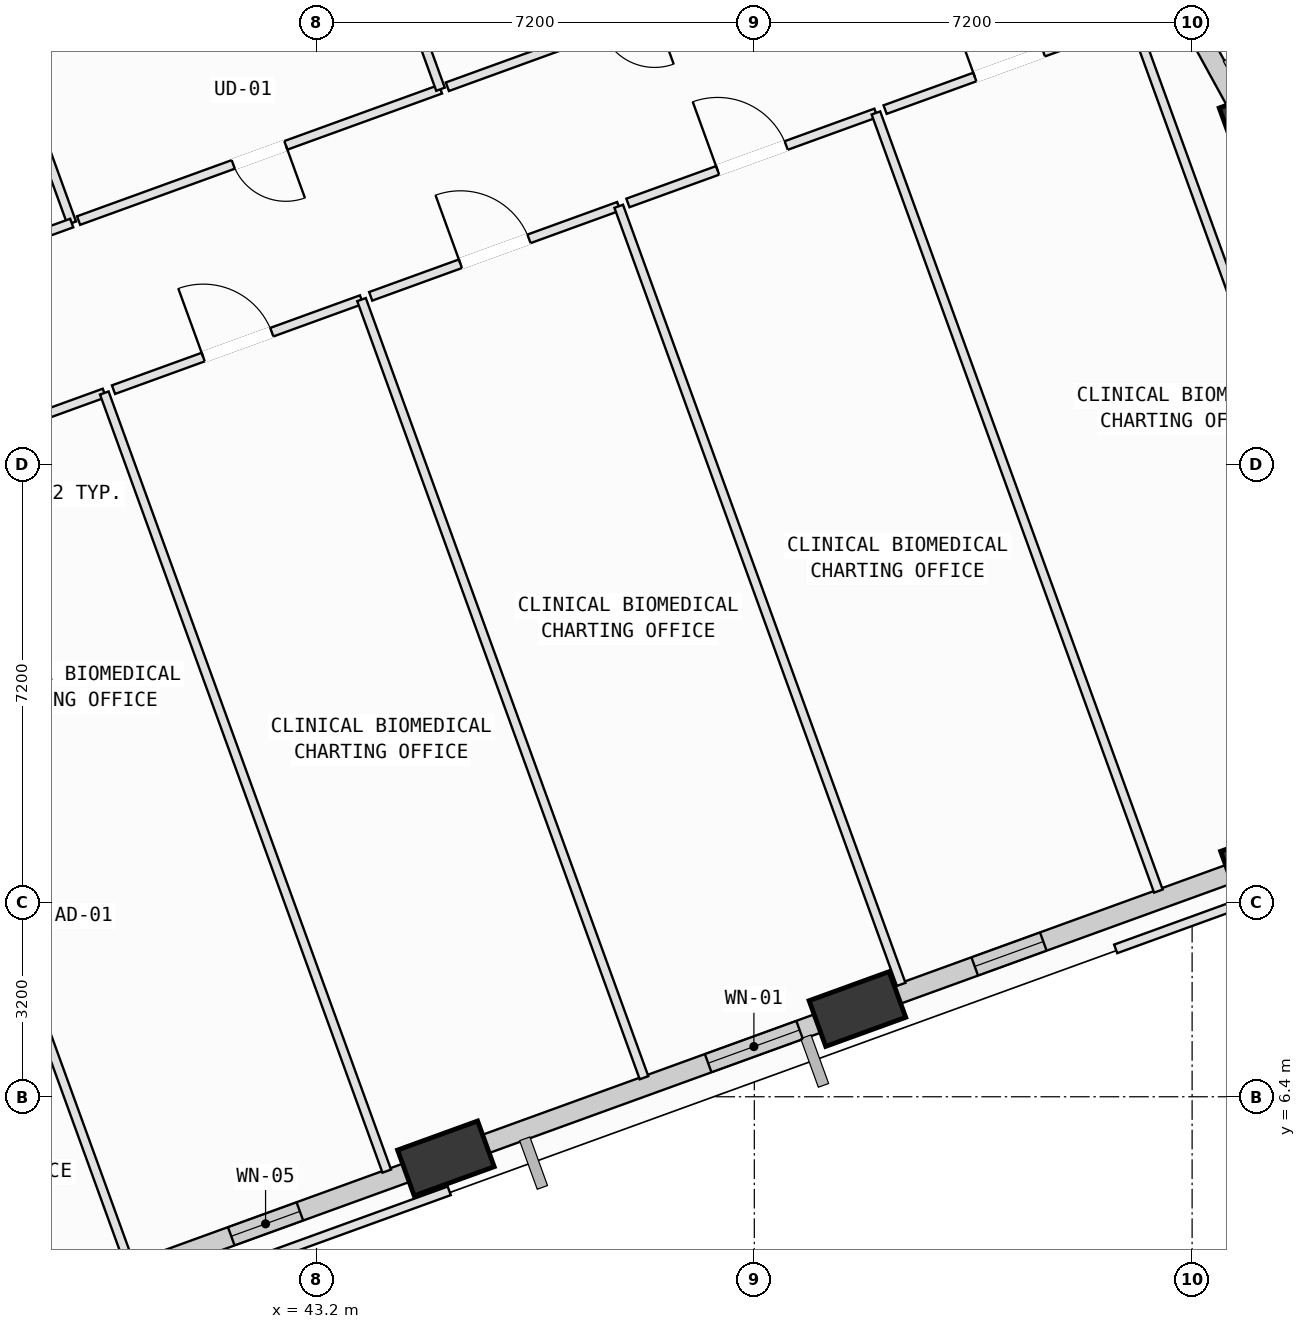
"""IFC4 building model, lengths in metres.
Left out: names, types, materials, properties, quantities, classifications, styles, units other than length and angle.
Written with IfcOpenShell. Run it as: python <this file> out.ifc"""

import sys

from ifc_helpers import new_model, si_unit, direction, frame, frame_2d, origin, origin_2d, place, context, subcontext, project, spatial, rectangle, extrude, element, fill, save


model = new_model("IFC4")
c1 = context("Model", 3, precision=1e-05, world=origin(), true_north=direction((0.0, 1.0)))
c2 = subcontext(c1, "Body", "Model", "MODEL_VIEW")
j1 = project(units=[si_unit("LENGTHUNIT", "METRE"), si_unit("PLANEANGLEUNIT", "RADIAN")], contexts=[c1])
p1 = place(None, origin())
s1 = spatial("IfcSite", under=j1, at=p1, CompositionType="ELEMENT")
p2 = place(p1, origin())
s2 = spatial("IfcBuilding", under=s1, at=p2, CompositionType="ELEMENT")
p3 = place(p2, frame((0.0, 0.0, 108.4)))
s3 = spatial("IfcBuildingStorey", under=s2, at=p3, CompositionType="ELEMENT", Elevation=108.4)
p4 = place(p3, frame((45.328, 5.386, 0.002), z_axis=(0.079678110457, 0.049084148961, 0.9956114428), x_axis=(-0.78224874538, 0.62214735669, 0.031930657927)))
e1 = element("IfcColumn", 1, at=p4, inside=s3, PredefinedType="COLUMN", context=c2, shape_type="SweptSolid", body=[
    extrude(rectangle(XDim=1.4, YDim=0.8, at=origin_2d()), origin(), (0.0, 0.0, 1.0), 4.014),
])
p5 = place(p3, frame((52.096, 7.843, 0.002), z_axis=(0.069270333832, 0.076805001722, 0.994636924994), x_axis=(-0.925321067949, 0.377538817765, 0.03528969099)))
e2 = element("IfcColumn", 2, at=p5, inside=s3, PredefinedType="COLUMN", context=c2, shape_type="SweptSolid", body=[
    extrude(rectangle(XDim=1.4, YDim=0.8, at=origin_2d()), origin(), (0.0, 0.0, 1.0), 4.018),
])
p6 = place(p3, frame((58.864, 10.3, 0.002), z_axis=(0.058831075792, 0.104440322179, 0.992789566638), x_axis=(-0.985243313153, 0.166201162188, 0.040899725852)))
e3 = element("IfcColumn", 3, at=p6, inside=s3, PredefinedType="COLUMN", context=c2, shape_type="SweptSolid", body=[
    extrude(rectangle(XDim=1.4, YDim=0.8, at=origin_2d()), origin(), (0.0, 0.0, 1.0), 4.025),
])
p7 = place(p3, frame((58.661, 22.141, 0.002), z_axis=(0.010086228897, 0.103414226406, 0.994587233863), x_axis=(0.248836012635, -0.96360846528, 0.097669670096)))
e4 = element("IfcColumn", 4, at=p7, inside=s3, PredefinedType="COLUMN", context=c2, shape_type="SweptSolid", body=[
    extrude(rectangle(XDim=1.4, YDim=0.8, at=origin_2d()), origin(), (0.0, 0.0, 1.0), 4.018),
])
p8 = place(p3, frame((45.036, 5.281, 0.0), z_axis=(0.0, 0.0, 1.0), x_axis=(-0.93999646123, -0.341184192006, 0.0)))
e5 = element("IfcWall", 5, at=p8, inside=s3, PredefinedType="SOLIDWALL", context=c2, shape_type="SweptSolid", body=[
    extrude(rectangle(XDim=6.209, YDim=0.32, at=frame_2d((3.104, 0.0))), origin(), (0.0, 0.0, 1.0), 3.165),
])
p9 = place(p8, frame((2.244, 0.0, 0.75)))
e6 = element("IfcOpeningElement", 6, at=p9, cuts=e5, PredefinedType="OPENING", context=c2, shape_type="SweptSolid", body=[
    extrude(rectangle(XDim=1.2, YDim=1.75, at=frame_2d((0.6, 0.875))), frame((0.0, 0.17, 0.0), z_axis=(0.0, -1.0, 0.0), x_axis=(1.0, 0.0, 0.0)), (0.0, 0.0, 1.0), 0.34),
])
p10 = place(p3, frame((51.811, 7.74, 0.0), z_axis=(0.0, 0.0, 1.0), x_axis=(-0.939992730325, -0.341194470846, 0.0)))
e7 = element("IfcWall", 7, at=p10, inside=s3, PredefinedType="SOLIDWALL", context=c2, shape_type="SweptSolid", body=[
    extrude(rectangle(XDim=6.218, YDim=0.32, at=frame_2d((3.109, 0.0))), origin(), (0.0, 0.0, 1.0), 3.165),
])
p11 = place(p10, frame((0.708, 0.0, 0.75)))
e8 = element("IfcOpeningElement", 8, at=p11, cuts=e7, PredefinedType="OPENING", context=c2, shape_type="SweptSolid", body=[
    extrude(rectangle(XDim=1.6, YDim=1.95, at=frame_2d((0.8, 0.975))), frame((0.0, 0.17, 0.0), z_axis=(0.0, -1.0, 0.0), x_axis=(1.0, 0.0, 0.0)), (0.0, 0.0, 1.0), 0.34),
])
p12 = place(p3, frame((58.593, 10.202, 0.0), z_axis=(0.0, 0.0, 1.0), x_axis=(-0.939989678863, -0.341202877524, 0.0)))
e9 = element("IfcWall", 9, at=p12, inside=s3, PredefinedType="SOLIDWALL", context=c2, shape_type="SweptSolid", body=[
    extrude(rectangle(XDim=6.242, YDim=0.32, at=frame_2d((3.121, 0.0))), origin(), (0.0, 0.0, 1.0), 3.165),
])
p13 = place(p12, frame((3.66, 0.0, 0.75)))
e10 = element("IfcOpeningElement", 10, at=p13, cuts=e9, PredefinedType="OPENING", context=c2, shape_type="SweptSolid", body=[
    extrude(rectangle(XDim=1.2, YDim=1.75, at=frame_2d((0.6, 0.875))), frame((0.0, 0.17, 0.0), z_axis=(0.0, -1.0, 0.0), x_axis=(1.0, 0.0, 0.0)), (0.0, 0.0, 1.0), 0.34),
])
p14 = place(p3, frame((54.097, 30.464, 0.0), z_axis=(0.0, 0.0, 1.0), x_axis=(0.480836721767, -0.876810154481, 0.0)))
e11 = element("IfcWall", 11, at=p14, inside=s3, PredefinedType="SOLIDWALL", context=c2, shape_type="SweptSolid", body=[
    extrude(rectangle(XDim=8.838, YDim=0.32, at=frame_2d((4.419, 0.0))), origin(), (0.0, 0.0, 1.0), 3.165),
])
p15 = place(p3, frame((36.15, 14.595, 0.0), z_axis=(0.0, 0.0, 1.0), x_axis=(0.341228228972, -0.939980476261, 0.0)))
e12 = element("IfcWall", 12, at=p15, inside=s3, PredefinedType="PARTITIONING", context=c2, shape_type="SweptSolid", body=[
    extrude(rectangle(XDim=11.652, YDim=0.15, at=frame_2d((5.826, 0.0))), origin(), (0.0, 0.0, 1.0), 3.78),
])
p16 = place(p15, frame((5.396, 0.0, 0.0)))
e13 = element("IfcOpeningElement", 13, at=p16, cuts=e12, PredefinedType="OPENING", context=c2, shape_type="SweptSolid", body=[
    extrude(rectangle(XDim=0.86, YDim=2.06, at=frame_2d((0.43, 1.03))), frame((0.0, 0.085, 0.0), z_axis=(0.0, -1.0, 0.0), x_axis=(1.0, 0.0, 0.0)), (0.0, 0.0, 1.0), 0.17),
])
p17 = place(p3, frame((36.5, 16.81, 0.0), z_axis=(0.0, 0.0, 1.0), x_axis=(0.94000198953, 0.341168960605, 0.0)))
e14 = element("IfcWall", 14, at=p17, inside=s3, PredefinedType="PARTITIONING", context=c2, shape_type="SweptSolid", body=[
    extrude(rectangle(XDim=3.415, YDim=0.15, at=frame_2d((1.708, 0.0))), origin(), (0.0, 0.0, 1.0), 2.965),
])
p18 = place(p17, frame((1.107, 0.0, 0.0)))
e15 = element("IfcOpeningElement", 15, at=p18, cuts=e14, PredefinedType="OPENING", context=c2, shape_type="SweptSolid", body=[
    extrude(rectangle(XDim=1.2, YDim=2.15, at=frame_2d((0.6, 1.075))), frame((0.0, 0.085, 0.0), z_axis=(0.0, -1.0, 0.0), x_axis=(1.0, 0.0, 0.0)), (0.0, 0.0, 1.0), 0.17),
])
p19 = place(p3, frame((39.71, 17.975, 0.0), z_axis=(0.0, 0.0, 1.0), x_axis=(0.341169968064, -0.940001623877, 0.0)))
e16 = element("IfcWall", 16, at=p19, inside=s3, PredefinedType="PARTITIONING", context=c2, shape_type="SweptSolid", body=[
    extrude(rectangle(XDim=13.615, YDim=0.15, at=frame_2d((6.808, 0.0))), origin(), (0.0, 0.0, 1.0), 3.78),
])
p20 = place(p3, frame((39.861, 18.03, 0.0), z_axis=(0.0, 0.0, 1.0), x_axis=(0.939960863027, 0.341282252656, 0.0)))
e17 = element("IfcWall", 17, at=p20, inside=s3, PredefinedType="PARTITIONING", context=c2, shape_type="SweptSolid", body=[
    extrude(rectangle(XDim=4.339, YDim=0.15, at=frame_2d((2.17, 0.0))), origin(), (0.0, 0.0, 1.0), 2.965),
])
p21 = place(p20, frame((1.57, 0.0, 0.0)))
e18 = element("IfcOpeningElement", 18, at=p21, cuts=e17, PredefinedType="OPENING", context=c2, shape_type="SweptSolid", body=[
    extrude(rectangle(XDim=1.2, YDim=2.15, at=frame_2d((0.6, 1.075))), frame((0.0, 0.085, 0.0), z_axis=(0.0, -1.0, 0.0), x_axis=(1.0, 0.0, 0.0)), (0.0, 0.0, 1.0), 0.17),
])
p22 = place(p3, frame((43.94, 19.511, 0.0), z_axis=(0.0, 0.0, 1.0), x_axis=(0.341233344025, -0.939978619398, 0.0)))
e19 = element("IfcWall", 19, at=p22, inside=s3, PredefinedType="PARTITIONING", context=c2, shape_type="SweptSolid", body=[
    extrude(rectangle(XDim=13.615, YDim=0.15, at=frame_2d((6.808, 0.0))), origin(), (0.0, 0.0, 1.0), 3.78),
])
p23 = place(p3, frame((46.044, 5.402, 0.0), z_axis=(0.0, 0.0, 1.0), x_axis=(-0.939800627122, -0.341723252445, 0.0)))
e20 = element("IfcWall", 20, at=p23, inside=s3, PredefinedType="PARTITIONING", context=c2, shape_type="SweptSolid", body=[
    extrude(rectangle(XDim=0.99, YDim=0.15, at=frame_2d((0.495, 0.0))), origin(), (0.0, 0.0, 1.0), 3.165),
])
p24 = place(p3, frame((44.091, 19.565, 0.0), z_axis=(0.0, 0.0, 1.0), x_axis=(0.939960863027, 0.341282252656, 0.0)))
e21 = element("IfcWall", 21, at=p24, inside=s3, PredefinedType="PARTITIONING", context=c2, shape_type="SweptSolid", body=[
    extrude(rectangle(XDim=4.339, YDim=0.15, at=frame_2d((2.17, 0.0))), origin(), (0.0, 0.0, 1.0), 3.78),
])
p25 = place(p24, frame((1.57, 0.0, 0.0)))
e22 = element("IfcOpeningElement", 22, at=p25, cuts=e21, PredefinedType="OPENING", context=c2, shape_type="SweptSolid", body=[
    extrude(rectangle(XDim=1.2, YDim=2.15, at=frame_2d((0.6, 1.075))), frame((0.0, 0.085, 0.0), z_axis=(0.0, -1.0, 0.0), x_axis=(1.0, 0.0, 0.0)), (0.0, 0.0, 1.0), 0.17),
])
p26 = place(p3, frame((48.17, 21.046, 0.0), z_axis=(0.0, 0.0, 1.0), x_axis=(0.341175718881, -0.93999953662, 0.0)))
e23 = element("IfcWall", 23, at=p26, inside=s3, PredefinedType="PARTITIONING", context=c2, shape_type="SweptSolid", body=[
    extrude(rectangle(XDim=13.615, YDim=0.15, at=frame_2d((6.807, 0.0))), origin(), (0.0, 0.0, 1.0), 3.78),
])
p27 = place(p3, frame((52.804, 7.856, 0.0), z_axis=(0.0, 0.0, 1.0), x_axis=(-0.940027533904, -0.341098571534, 0.0)))
e24 = element("IfcWall", 24, at=p27, inside=s3, PredefinedType="PARTITIONING", context=c2, shape_type="SweptSolid", body=[
    extrude(rectangle(XDim=0.973, YDim=0.15, at=frame_2d((0.487, 0.0))), origin(), (0.0, 0.0, 1.0), 3.165),
])
p28 = place(p3, frame((48.321, 21.101, 0.0), z_axis=(0.0, 0.0, 1.0), x_axis=(0.940033040483, 0.341083395667, 0.0)))
e25 = element("IfcWall", 25, at=p28, inside=s3, PredefinedType="PARTITIONING", context=c2, shape_type="SweptSolid", body=[
    extrude(rectangle(XDim=4.339, YDim=0.15, at=frame_2d((2.169, 0.0))), origin(), (0.0, 0.0, 1.0), 3.78),
])
p29 = place(p28, frame((1.57, 0.0, 0.0)))
e26 = element("IfcOpeningElement", 26, at=p29, cuts=e25, PredefinedType="OPENING", context=c2, shape_type="SweptSolid", body=[
    extrude(rectangle(XDim=1.2, YDim=2.15, at=frame_2d((0.6, 1.075))), frame((0.0, 0.085, 0.0), z_axis=(0.0, -1.0, 0.0), x_axis=(1.0, 0.0, 0.0)), (0.0, 0.0, 1.0), 0.17),
])
p30 = place(p3, frame((52.4, 22.581, 0.0), z_axis=(0.0, 0.0, 1.0), x_axis=(0.341169968064, -0.940001623877, 0.0)))
e27 = element("IfcWall", 27, at=p30, inside=s3, PredefinedType="PARTITIONING", context=c2, shape_type="SweptSolid", body=[
    extrude(rectangle(XDim=13.615, YDim=0.15, at=frame_2d((6.808, 0.0))), origin(), (0.0, 0.0, 1.0), 3.78),
])
p31 = place(p3, frame((52.551, 22.636, 0.0), z_axis=(0.0, 0.0, 1.0), x_axis=(0.939960863027, 0.341282252656, 0.0)))
e28 = element("IfcWall", 28, at=p31, inside=s3, PredefinedType="PARTITIONING", context=c2, shape_type="SweptSolid", body=[
    extrude(rectangle(XDim=4.339, YDim=0.15, at=frame_2d((2.17, 0.0))), origin(), (0.0, 0.0, 1.0), 3.78),
])
p32 = place(p31, frame((1.57, 0.0, 0.0)))
e29 = element("IfcOpeningElement", 29, at=p32, cuts=e28, PredefinedType="OPENING", context=c2, shape_type="SweptSolid", body=[
    extrude(rectangle(XDim=1.2, YDim=2.15, at=frame_2d((0.6, 1.075))), frame((0.0, 0.085, 0.0), z_axis=(0.0, -1.0, 0.0), x_axis=(1.0, 0.0, 0.0)), (0.0, 0.0, 1.0), 0.17),
])
p33 = place(p3, frame((56.63, 24.117, 0.0), z_axis=(0.0, 0.0, 1.0), x_axis=(0.341191171741, -0.939993927813, 0.0)))
e30 = element("IfcWall", 30, at=p33, inside=s3, PredefinedType="PARTITIONING", context=c2, shape_type="SweptSolid", body=[
    extrude(rectangle(XDim=11.261, YDim=0.15, at=frame_2d((5.63, 0.0))), origin(), (0.0, 0.0, 1.0), 3.78),
])
p34 = place(p3, frame((37.739, 24.723, 0.0), z_axis=(0.0, 0.0, 1.0), x_axis=(0.341248910369, -0.93997296832, 0.0)))
e31 = element("IfcWall", 31, at=p34, inside=s3, PredefinedType="PARTITIONING", context=c2, shape_type="SweptSolid", body=[
    extrude(rectangle(XDim=4.205, YDim=0.15, at=frame_2d((2.103, 0.0))), origin(), (0.0, 0.0, 1.0), 3.78),
])
p35 = place(p3, frame((39.174, 20.77, 0.0), z_axis=(0.0, 0.0, 1.0), x_axis=(-0.940050872134, -0.341034247253, 0.0)))
e32 = element("IfcWall", 32, at=p35, inside=s3, PredefinedType="PARTITIONING", context=c2, shape_type="SweptSolid", body=[
    extrude(rectangle(XDim=1.217, YDim=0.15, at=frame_2d((0.608, 0.0))), origin(), (0.0, 0.0, 1.0), 3.78),
])
p36 = place(p3, frame((45.239, 22.971, 0.0), z_axis=(0.0, 0.0, 1.0), x_axis=(-0.940017254775, -0.341126898273, 0.0)))
e33 = element("IfcWall", 33, at=p36, inside=s3, PredefinedType="PARTITIONING", context=c2, shape_type="SweptSolid", body=[
    extrude(rectangle(XDim=6.332, YDim=0.15, at=frame_2d((3.166, 0.0))), origin(), (0.0, 0.0, 1.0), 2.945),
])
p37 = place(p36, frame((2.706, 0.0, 0.0)))
e34 = element("IfcOpeningElement", 34, at=p37, cuts=e33, PredefinedType="OPENING", context=c2, shape_type="SweptSolid", body=[
    extrude(rectangle(XDim=0.92, YDim=2.1, at=frame_2d((0.46, 1.05))), frame((0.0, 0.085, 0.0), z_axis=(0.0, -1.0, 0.0), x_axis=(1.0, 0.0, 0.0)), (0.0, 0.0, 1.0), 0.17),
])
p38 = place(p3, frame((43.804, 26.924, 0.0), z_axis=(0.0, 0.0, 1.0), x_axis=(0.341230289232, -0.939979728351, 0.0)))
e35 = element("IfcWall", 35, at=p38, inside=s3, PredefinedType="PARTITIONING", context=c2, shape_type="SweptSolid", body=[
    extrude(rectangle(XDim=4.206, YDim=0.15, at=frame_2d((2.103, 0.0))), origin(), (0.0, 0.0, 1.0), 3.365),
])
p39 = place(p3, frame((51.303, 25.173, 0.0), z_axis=(0.0, 0.0, 1.0), x_axis=(-0.939937453114, -0.341346721434, 0.0)))
e36 = element("IfcWall", 36, at=p39, inside=s3, PredefinedType="PARTITIONING", context=c2, shape_type="SweptSolid", body=[
    extrude(rectangle(XDim=6.331, YDim=0.15, at=frame_2d((3.166, 0.0))), origin(), (0.0, 0.0, 1.0), 3.78),
])
p40 = place(p39, frame((2.706, 0.0, 0.0)))
e37 = element("IfcOpeningElement", 37, at=p40, cuts=e36, PredefinedType="OPENING", context=c2, shape_type="SweptSolid", body=[
    extrude(rectangle(XDim=0.92, YDim=2.1, at=frame_2d((0.46, 1.05))), frame((0.0, 0.085, 0.0), z_axis=(0.0, -1.0, 0.0), x_axis=(1.0, 0.0, 0.0)), (0.0, 0.0, 1.0), 0.17),
])
p41 = place(p3, frame((45.383, 4.853, 0.0), z_axis=(0.0, 0.0, 1.0), x_axis=(-0.940026660647, -0.341100978119, 0.0)))
e38 = element("IfcWall", 38, at=p41, inside=s3, PredefinedType="PARTITIONING", context=c2, shape_type="SweptSolid", body=[
    extrude(rectangle(XDim=5.74, YDim=0.15, at=frame_2d((2.87, 0.0))), origin(), (0.0, 0.0, 1.0), 3.78),
])
p42 = place(p3, frame((60.357, 10.289, 0.0), z_axis=(0.0, 0.0, 1.0), x_axis=(-0.939986910804, -0.341210503234, 0.0)))
e39 = element("IfcWall", 39, at=p42, inside=s3, PredefinedType="PARTITIONING", context=c2, shape_type="SweptSolid", body=[
    extrude(rectangle(XDim=4.27, YDim=0.15, at=frame_2d((2.135, 0.0))), origin(), (0.0, 0.0, 1.0), 3.78),
])
p43 = place(p9, origin())
e40 = element("IfcWindow", 40, at=p43, inside=s3, PartitioningType="SINGLE_PANEL", PredefinedType="WINDOW", context=c2, shape_type="SweptSolid", body=[
    extrude(rectangle(XDim=1.2, YDim=1.75, at=frame_2d((0.6, 0.875))), frame((0.0, 0.03, 0.0), z_axis=(0.0, -1.0, 0.0), x_axis=(1.0, 0.0, 0.0)), (0.0, 0.0, 1.0), 0.06),
])
fill(e6, e40)
p44 = place(p11, origin())
e41 = element("IfcWindow", 41, at=p44, inside=s3, PartitioningType="SINGLE_PANEL", PredefinedType="WINDOW", context=c2, shape_type="SweptSolid", body=[
    extrude(rectangle(XDim=1.6, YDim=1.95, at=frame_2d((0.8, 0.975))), frame((0.0, 0.03, 0.0), z_axis=(0.0, -1.0, 0.0), x_axis=(1.0, 0.0, 0.0)), (0.0, 0.0, 1.0), 0.06),
])
fill(e8, e41)
p45 = place(p13, origin())
e42 = element("IfcWindow", 42, at=p45, inside=s3, PartitioningType="SINGLE_PANEL", PredefinedType="WINDOW", context=c2, shape_type="SweptSolid", body=[
    extrude(rectangle(XDim=1.2, YDim=1.75, at=frame_2d((0.6, 0.875))), frame((0.0, 0.03, 0.0), z_axis=(0.0, -1.0, 0.0), x_axis=(1.0, 0.0, 0.0)), (0.0, 0.0, 1.0), 0.06),
])
fill(e10, e42)
p46 = place(p21, origin())
e43 = element("IfcDoor", 43, at=p46, inside=s3, OperationType="SINGLE_SWING_LEFT", PredefinedType="DOOR", context=c2, shape_type="SweptSolid", body=[
    extrude(rectangle(XDim=1.2, YDim=2.15, at=frame_2d((0.6, 1.075))), frame((0.0, 0.025, 0.0), z_axis=(0.0, -1.0, 0.0), x_axis=(1.0, 0.0, 0.0)), (0.0, 0.0, 1.0), 0.05),
])
fill(e18, e43)
p47 = place(p25, origin())
e44 = element("IfcDoor", 44, at=p47, inside=s3, OperationType="SINGLE_SWING_LEFT", PredefinedType="DOOR", context=c2, shape_type="SweptSolid", body=[
    extrude(rectangle(XDim=1.2, YDim=2.15, at=frame_2d((0.6, 1.075))), frame((0.0, 0.025, 0.0), z_axis=(0.0, -1.0, 0.0), x_axis=(1.0, 0.0, 0.0)), (0.0, 0.0, 1.0), 0.05),
])
fill(e22, e44)
p48 = place(p29, origin())
e45 = element("IfcDoor", 45, at=p48, inside=s3, OperationType="SINGLE_SWING_LEFT", PredefinedType="DOOR", context=c2, shape_type="SweptSolid", body=[
    extrude(rectangle(XDim=1.2, YDim=2.15, at=frame_2d((0.6, 1.075))), frame((0.0, 0.025, 0.0), z_axis=(0.0, -1.0, 0.0), x_axis=(1.0, 0.0, 0.0)), (0.0, 0.0, 1.0), 0.05),
])
fill(e26, e45)
p49 = place(p32, origin())
e46 = element("IfcDoor", 46, at=p49, inside=s3, OperationType="SINGLE_SWING_LEFT", PredefinedType="DOOR", context=c2, shape_type="SweptSolid", body=[
    extrude(rectangle(XDim=1.2, YDim=2.15, at=frame_2d((0.6, 1.075))), frame((0.0, 0.025, 0.0), z_axis=(0.0, -1.0, 0.0), x_axis=(1.0, 0.0, 0.0)), (0.0, 0.0, 1.0), 0.05),
])
fill(e29, e46)
p50 = place(p37, origin())
e47 = element("IfcDoor", 47, at=p50, inside=s3, OperationType="SINGLE_SWING_LEFT", PredefinedType="DOOR", context=c2, shape_type="SweptSolid", body=[
    extrude(rectangle(XDim=0.92, YDim=2.1, at=frame_2d((0.46, 1.05))), frame((0.0, 0.025, 0.0), z_axis=(0.0, -1.0, 0.0), x_axis=(1.0, 0.0, 0.0)), (0.0, 0.0, 1.0), 0.05),
])
fill(e34, e47)
save(model, sys.argv[1])
